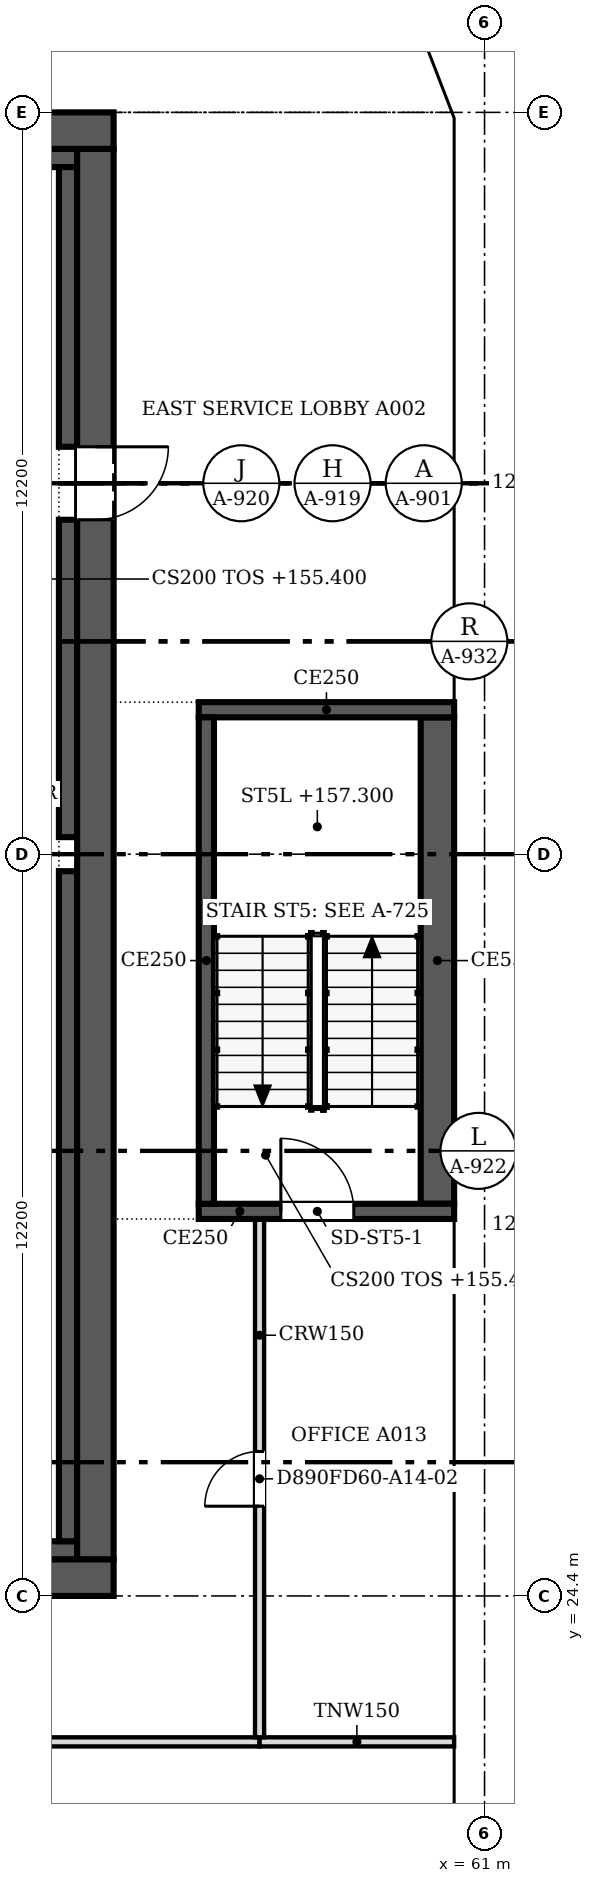
"""IFC4 building model, lengths in metres.
Left out: names, types, materials, properties, quantities, classifications, styles, units other than length and angle.
Written with IfcOpenShell. Run it as: python <this file> out.ifc"""

import sys

from ifc_helpers import new_model, si_unit, direction, frame, frame_2d, origin, place, context, subcontext, project, spatial, polyline, rectangle, outline, extrude, faceted_brep, source, transform, mapped, element, fill, save


model = new_model("IFC4")
c1 = context("Model", 3, precision=1e-05, world=origin(), true_north=direction((0.0, 1.0)))
c2 = subcontext(c1, "Body", "Model", "MODEL_VIEW")
j1 = project(units=[si_unit("LENGTHUNIT", "METRE"), si_unit("PLANEANGLEUNIT", "RADIAN")], contexts=[c1])
p1 = place(None, origin())
s1 = spatial("IfcSite", under=j1, at=p1, CompositionType="ELEMENT")
p2 = place(p1, origin())
s2 = spatial("IfcBuilding", under=s1, at=p2, CompositionType="ELEMENT")
p3 = place(p2, frame((0.0, 0.0, 155.4)))
s3 = spatial("IfcBuildingStorey", under=s2, at=p3, CompositionType="ELEMENT", Elevation=155.4)
m1 = source(origin(), c2, "Body", "Brep", [
    faceted_brep([(6.1, -0.25, 0.0), (3.05, -0.25, 3.8), (0.0, -0.25, 0.0), (6.1, -0.25, 0.0), (0.0, 0.25, 0.0), (3.05, 0.25, 3.8), (6.1, 0.25, 0.0), (6.1, 0.25, 0.0)], [[[0, 1, 2, 3]], [[4, 5, 6, 7]], [[6, 5, 1, 0]], [[5, 4, 2, 1]], [[4, 7, 3, 2]], [[3, 7, 6, 0]]]),
])
p4 = place(p3, frame((60.75, 18.3, 0.0), z_axis=(0.0, 0.0, 1.0), x_axis=(0.0, 1.0, 0.0)))
e1 = element("IfcWall", 1, at=p4, inside=s3, PredefinedType="SOLIDWALL", context=c2, shape_type="MappedRepresentation", body=[
    mapped(m1, transform((0.0, 0.0, 0.0), scale=1.0)),
])
m2 = source(origin(), c2, "Body", "SweptSolid", [
    extrude(outline(polyline([(5.579, 0.25), (3.05, 3.401), (0.521, 0.25), (5.579, 0.25)])), frame((0.0, 0.26, 0.0), z_axis=(0.0, -1.0, 0.0), x_axis=(1.0, 0.0, 0.0)), (0.0, 0.0, 1.0), 0.52),
])
p5 = place(p4, origin())
e2 = element("IfcOpeningElement", 2, at=p5, cuts=e1, PredefinedType="OPENING", context=c2, shape_type="MappedRepresentation", body=[
    mapped(m2, transform((0.0, 0.0, 0.0), scale=1.0)),
])
m3 = source(origin(), c2, "Body", "SweptSolid", [
    extrude(outline(polyline([(6.1, 0.0), (3.05, 3.8), (0.0, 0.0), (6.1, 0.0)])), frame((0.0, 0.25, 0.0), z_axis=(0.0, -1.0, 0.0), x_axis=(1.0, 0.0, 0.0)), (0.0, 0.0, 1.0), 0.5),
])
p6 = place(p3, frame((60.75, 24.4, 0.0), z_axis=(0.0, 0.0, 1.0), x_axis=(0.0, 1.0, 0.0)))
e3 = element("IfcWall", 3, at=p6, inside=s3, PredefinedType="SOLIDWALL", context=c2, shape_type="MappedRepresentation", body=[
    mapped(m3, transform((0.0, 0.0, 0.0), scale=1.0)),
])
p7 = place(p6, origin())
e4 = element("IfcOpeningElement", 4, at=p7, cuts=e3, PredefinedType="OPENING", context=c2, shape_type="MappedRepresentation", body=[
    mapped(m2, transform((0.0, 0.0, 0.0), scale=1.0)),
])
p8 = place(p3, frame((60.75, 30.5, 0.0), z_axis=(0.0, 0.0, 1.0), x_axis=(0.0, 1.0, 0.0)))
e5 = element("IfcWall", 5, at=p8, inside=s3, PredefinedType="SOLIDWALL", context=c2, shape_type="MappedRepresentation", body=[
    mapped(m3, transform((0.0, 0.0, 0.0), scale=1.0)),
])
p9 = place(p8, origin())
e6 = element("IfcOpeningElement", 6, at=p9, cuts=e5, PredefinedType="OPENING", context=c2, shape_type="MappedRepresentation", body=[
    mapped(m2, transform((0.0, 0.0, 0.0), scale=1.0)),
])
p10 = place(p3, frame((60.75, 36.6, 0.0), z_axis=(0.0, 0.0, 1.0), x_axis=(0.0, 1.0, 0.0)))
e7 = element("IfcWall", 7, at=p10, inside=s3, PredefinedType="SOLIDWALL", context=c2, shape_type="MappedRepresentation", body=[
    mapped(m1, transform((0.0, 0.0, 0.0), scale=1.0)),
])
p11 = place(p10, origin())
e8 = element("IfcOpeningElement", 8, at=p11, cuts=e7, PredefinedType="OPENING", context=c2, shape_type="MappedRepresentation", body=[
    mapped(m2, transform((0.0, 0.0, 0.0), scale=1.0)),
])
m4 = source(origin(), c2, "Body", "Brep", [
    faceted_brep([(6.053, -0.25, 0.0), (3.05, -0.25, 3.8), (0.0, -0.25, 0.0), (0.0, 0.25, 0.0), (3.05, 0.25, 3.8), (6.007, 0.25, 0.059), (6.007, 0.25, 0.0), (6.053, 0.0, 0.0)], [[[0, 1, 2]], [[3, 4, 5, 6]], [[5, 4, 1, 0, 7]], [[4, 3, 2, 1]], [[3, 6, 7, 0, 2]], [[7, 6, 5]]]),
])
p12 = place(p3, frame((60.75, 42.7, 0.0), z_axis=(0.0, 0.0, 1.0), x_axis=(0.0, 1.0, 0.0)))
e9 = element("IfcWall", 9, at=p12, inside=s3, PredefinedType="SOLIDWALL", context=c2, shape_type="MappedRepresentation", body=[
    mapped(m4, transform((0.0, 0.0, 0.0), scale=1.0)),
])
m5 = source(origin(), c2, "Body", "SweptSolid", [
    extrude(outline(polyline([(5.537, 0.25), (3.049, 3.399), (0.521, 0.25), (5.537, 0.25)])), frame((0.0, 0.26, 0.0), z_axis=(0.0, -1.0, 0.0), x_axis=(1.0, 0.0, 0.0)), (0.0, 0.0, 1.0), 0.52),
])
p13 = place(p12, origin())
e10 = element("IfcOpeningElement", 10, at=p13, cuts=e9, PredefinedType="OPENING", context=c2, shape_type="MappedRepresentation", body=[
    mapped(m5, transform((0.0, 0.0, 0.0), scale=1.0)),
])
m6 = source(origin(), c2, "Body", "Brep", [
    faceted_brep([(3.003, -0.25, 3.732), (2.95, -0.25, 3.8), (0.0, -0.25, 0.0), (3.003, -0.25, 0.0), (0.047, 0.25, 0.06), (2.898, 0.25, 3.732), (2.898, 0.25, 0.0), (0.047, 0.25, 0.0), (2.95, 0.0, 3.8), (0.0, 0.0, 0.0)], [[[0, 1, 2, 3]], [[4, 5, 6, 7]], [[8, 1, 0]], [[5, 4, 9, 2, 1, 8]], [[7, 6, 3, 2, 9]], [[7, 9, 4]], [[3, 6, 5, 8, 0]]]),
])
p14 = place(p3, frame((60.75, 48.753, 0.0), z_axis=(0.0, 0.0, 1.0), x_axis=(-0.35992665181, 0.932980602862, 0.0)))
e11 = element("IfcWall", 11, at=p14, inside=s3, PredefinedType="SOLIDWALL", context=c2, shape_type="MappedRepresentation", body=[
    mapped(m6, transform((0.0, 0.0, 0.0), scale=1.0)),
])
m7 = source(origin(), c2, "Body", "SweptSolid", [
    extrude(outline(polyline([(2.75, 3.135), (0.511, 0.25), (2.75, 0.25), (2.75, 3.135)])), frame((0.0, 0.26, 0.0), z_axis=(0.0, -1.0, 0.0), x_axis=(1.0, 0.0, 0.0)), (0.0, 0.0, 1.0), 0.52),
])
p15 = place(p14, origin())
e12 = element("IfcOpeningElement", 12, at=p15, cuts=e11, PredefinedType="OPENING", context=c2, shape_type="MappedRepresentation", body=[
    mapped(m7, transform((0.0, 0.0, 0.0), scale=1.0)),
])
p16 = place(p2, frame((0.0, 0.0, 159.2)))
s4 = spatial("IfcBuildingStorey", under=s2, at=p16, CompositionType="ELEMENT", Elevation=159.2)
m8 = source(origin(), c2, "Body", "SweptSolid", [
    extrude(outline(polyline([(3.05, 0.0), (6.1, 3.8), (3.05, 7.6), (0.0, 3.8), (3.05, 0.0)])), frame((0.0, 0.25, 0.0), z_axis=(0.0, -1.0, 0.0), x_axis=(1.0, 0.0, 0.0)), (0.0, 0.0, 1.0), 0.5),
])
p17 = place(p16, frame((60.75, 15.25, -3.8), z_axis=(0.0, 0.0, 1.0), x_axis=(0.0, 1.0, 0.0)))
e13 = element("IfcWall", 13, at=p17, inside=s4, PredefinedType="SOLIDWALL", context=c2, shape_type="MappedRepresentation", body=[
    mapped(m8, transform((0.0, 0.0, 0.0), scale=1.0)),
])
m9 = source(origin(), c2, "Body", "SweptSolid", [
    extrude(outline(polyline([(3.05, 0.399), (5.78, 3.8), (3.05, 7.201), (0.321, 3.8), (3.05, 0.399)])), frame((0.0, 0.26, 0.0), z_axis=(0.0, -1.0, 0.0), x_axis=(1.0, 0.0, 0.0)), (0.0, 0.0, 1.0), 0.52),
])
p18 = place(p17, origin())
e14 = element("IfcOpeningElement", 14, at=p18, cuts=e13, PredefinedType="OPENING", context=c2, shape_type="MappedRepresentation", body=[
    mapped(m9, transform((0.0, 0.0, 0.0), scale=1.0)),
])
m10 = source(origin(), c2, "Body", "Brep", [
    faceted_brep([(3.05, -0.25, 0.0), (6.1, -0.25, 3.8), (6.1, -0.25, 3.8), (3.05, -0.25, 7.6), (0.0, -0.25, 3.8), (0.0, 0.25, 3.8), (3.05, 0.25, 7.6), (6.1, 0.25, 3.8), (6.1, 0.25, 3.8), (3.05, 0.25, 0.0)], [[[0, 1, 2, 3, 4]], [[5, 6, 7, 8, 9]], [[9, 8, 1, 0]], [[7, 6, 3, 2]], [[6, 5, 4, 3]], [[5, 9, 0, 4]], [[1, 8, 7, 2]]]),
])
p19 = place(p16, frame((60.75, 21.35, -3.8), z_axis=(0.0, 0.0, 1.0), x_axis=(0.0, 1.0, 0.0)))
e15 = element("IfcWall", 15, at=p19, inside=s4, PredefinedType="SOLIDWALL", context=c2, shape_type="MappedRepresentation", body=[
    mapped(m10, transform((0.0, 0.0, 0.0), scale=1.0)),
])
p20 = place(p19, origin())
e16 = element("IfcOpeningElement", 16, at=p20, cuts=e15, PredefinedType="OPENING", context=c2, shape_type="MappedRepresentation", body=[
    mapped(m9, transform((0.0, 0.0, 0.0), scale=1.0)),
])
p21 = place(p16, frame((60.75, 27.45, -3.8), z_axis=(0.0, 0.0, 1.0), x_axis=(0.0, 1.0, 0.0)))
e17 = element("IfcWall", 17, at=p21, inside=s4, PredefinedType="SOLIDWALL", context=c2, shape_type="MappedRepresentation", body=[
    mapped(m8, transform((0.0, 0.0, 0.0), scale=1.0)),
])
p22 = place(p21, origin())
e18 = element("IfcOpeningElement", 18, at=p22, cuts=e17, PredefinedType="OPENING", context=c2, shape_type="MappedRepresentation", body=[
    mapped(m9, transform((0.0, 0.0, 0.0), scale=1.0)),
])
p23 = place(p16, frame((60.75, 33.55, -3.8), z_axis=(0.0, 0.0, 1.0), x_axis=(0.0, 1.0, 0.0)))
e19 = element("IfcWall", 19, at=p23, inside=s4, PredefinedType="SOLIDWALL", context=c2, shape_type="MappedRepresentation", body=[
    mapped(m10, transform((0.0, 0.0, 0.0), scale=1.0)),
])
p24 = place(p23, origin())
e20 = element("IfcOpeningElement", 20, at=p24, cuts=e19, PredefinedType="OPENING", context=c2, shape_type="MappedRepresentation", body=[
    mapped(m9, transform((0.0, 0.0, 0.0), scale=1.0)),
])
p25 = place(p16, frame((60.75, 39.65, -3.8), z_axis=(0.0, 0.0, 1.0), x_axis=(0.0, 1.0, 0.0)))
e21 = element("IfcWall", 21, at=p25, inside=s4, PredefinedType="SOLIDWALL", context=c2, shape_type="MappedRepresentation", body=[
    mapped(m8, transform((0.0, 0.0, 0.0), scale=1.0)),
])
p26 = place(p25, origin())
e22 = element("IfcOpeningElement", 22, at=p26, cuts=e21, PredefinedType="OPENING", context=c2, shape_type="MappedRepresentation", body=[
    mapped(m9, transform((0.0, 0.0, 0.0), scale=1.0)),
])
m11 = source(origin(), c2, "Body", "Brep", [
    faceted_brep([(3.003, -0.25, 0.0), (3.05, -0.25, 0.06), (3.05, -0.25, 7.54), (3.003, -0.25, 7.6), (0.0, -0.25, 3.8), (0.0, 0.25, 3.8), (2.957, 0.25, 7.541), (2.957, 0.25, 0.059), (3.003, 0.0, 0.0), (3.003, 0.0, 7.6)], [[[0, 1, 2, 3, 4]], [[5, 6, 7]], [[1, 0, 8]], [[9, 3, 2]], [[6, 5, 4, 3, 9]], [[5, 7, 8, 0, 4]], [[1, 8, 7, 6, 9, 2]]]),
])
p27 = place(p16, frame((60.75, 45.75, -3.8), z_axis=(0.0, 0.0, 1.0), x_axis=(0.0, 1.0, 0.0)))
e23 = element("IfcWall", 23, at=p27, inside=s4, PredefinedType="SOLIDWALL", context=c2, shape_type="MappedRepresentation", body=[
    mapped(m11, transform((0.0, 0.0, 0.0), scale=1.0)),
])
m12 = source(origin(), c2, "Body", "SweptSolid", [
    extrude(outline(polyline([(2.803, 6.944), (0.319, 3.8), (2.803, 0.656), (2.803, 6.944)])), frame((0.0, 0.26, 0.0), z_axis=(0.0, -1.0, 0.0), x_axis=(1.0, 0.0, 0.0)), (0.0, 0.0, 1.0), 0.52),
])
p28 = place(p27, origin())
e24 = element("IfcOpeningElement", 24, at=p28, cuts=e23, PredefinedType="OPENING", context=c2, shape_type="MappedRepresentation", body=[
    mapped(m12, transform((0.0, 0.0, 0.0), scale=1.0)),
])
m13 = source(origin(), c2, "Body", "Brep", [
    faceted_brep([(0.047, -0.25, 0.0), (2.997, -0.25, 3.8), (0.047, -0.25, 7.6), (0.0, -0.25, 7.541), (0.0, -0.25, 0.059), (0.093, 0.25, 7.54), (2.944, 0.25, 3.868), (2.944, 0.25, 3.732), (0.093, 0.25, 0.06), (2.997, 0.0, 3.8), (0.047, 0.0, 0.0), (0.047, 0.0, 7.6)], [[[0, 1, 2, 3, 4]], [[5, 6, 7, 8]], [[8, 7, 9, 1, 0, 10]], [[6, 5, 11, 2, 1, 9]], [[3, 2, 11]], [[10, 0, 4]], [[8, 10, 4, 3, 11, 5]], [[9, 7, 6]]]),
])
p29 = place(p16, frame((60.767, 48.71, -3.8), z_axis=(0.0, 0.0, 1.0), x_axis=(-0.359901446078, 0.932990326376, 0.0)))
e25 = element("IfcWall", 25, at=p29, inside=s4, PredefinedType="SOLIDWALL", context=c2, shape_type="MappedRepresentation", body=[
    mapped(m13, transform((0.0, 0.0, 0.0), scale=1.0)),
])
m14 = source(origin(), c2, "Body", "SweptSolid", [
    extrude(outline(polyline([(0.247, 0.665), (2.681, 3.8), (0.247, 6.935), (0.247, 0.665)])), frame((0.0, 0.26, 0.0), z_axis=(0.0, -1.0, 0.0), x_axis=(1.0, 0.0, 0.0)), (0.0, 0.0, 1.0), 0.52),
])
p30 = place(p29, origin())
e26 = element("IfcOpeningElement", 26, at=p30, cuts=e25, PredefinedType="OPENING", context=c2, shape_type="MappedRepresentation", body=[
    mapped(m14, transform((0.0, 0.0, 0.0), scale=1.0)),
])
p31 = place(p3, frame((54.9, 24.7, 0.0), z_axis=(0.0, 0.0, 1.0), x_axis=(-1.0, 0.0, 0.0)))
e27 = element("IfcWall", 27, at=p31, inside=s3, PredefinedType="SHEAR", context=c2, shape_type="SweptSolid", body=[
    extrude(rectangle(XDim=24.4, YDim=0.6, at=frame_2d((12.2, 0.0))), origin(), (0.0, 0.0, 1.0), 3.8),
])
m15 = source(origin(), c2, "Body", "SweptSolid", [
    extrude(rectangle(XDim=1.2, YDim=2.1, at=frame_2d((0.6, 1.05))), frame((0.0, 0.31, 0.0), z_axis=(0.0, -1.0, 0.0), x_axis=(1.0, 0.0, 0.0)), (0.0, 0.0, 1.0), 0.62),
])
p32 = place(p31, frame((1.5, 0.0, 0.0)))
e28 = element("IfcOpeningElement", 28, at=p32, cuts=e27, PredefinedType="OPENING", context=c2, shape_type="MappedRepresentation", body=[
    mapped(m15, transform((0.0, 0.0, 0.0), scale=1.0)),
])
p33 = place(p3, frame((30.5, 48.5, 0.0), z_axis=(0.0, 0.0, 1.0), x_axis=(1.0, 0.0, 0.0)))
e29 = element("IfcWall", 29, at=p33, inside=s3, PredefinedType="SHEAR", context=c2, shape_type="SweptSolid", body=[
    extrude(rectangle(XDim=24.4, YDim=0.6, at=frame_2d((12.2, 0.0))), origin(), (0.0, 0.0, 1.0), 3.8),
])
p34 = place(p3, frame((54.6, 48.2, 0.0), z_axis=(0.0, 0.0, 1.0), x_axis=(0.0, -1.0, 0.0)))
e30 = element("IfcWall", 30, at=p34, inside=s3, PredefinedType="SHEAR", context=c2, shape_type="SweptSolid", body=[
    extrude(rectangle(XDim=23.2, YDim=0.6, at=frame_2d((11.6, 0.0))), origin(), (0.0, 0.0, 1.0), 3.8),
])
p35 = place(p34, frame((4.9, 0.0, 0.0)))
e31 = element("IfcOpeningElement", 31, at=p35, cuts=e30, PredefinedType="OPENING", context=c2, shape_type="MappedRepresentation", body=[
    mapped(m15, transform((0.0, 0.0, 0.0), scale=1.0)),
])
p36 = place(p3, frame((53.4, 25.15, 0.0), z_axis=(0.0, 0.0, 1.0), x_axis=(1.0, 0.0, 0.0)))
e32 = element("IfcWall", 32, at=p36, inside=s3, PredefinedType="SOLIDWALL", context=c2, shape_type="SweptSolid", body=[
    extrude(rectangle(XDim=0.9, YDim=0.3, at=frame_2d((0.45, 0.0))), origin(), (0.0, 0.0, 1.0), 3.8),
])
p37 = place(p3, frame((31.1, 48.05, 0.0), z_axis=(0.0, 0.0, 1.0), x_axis=(1.0, 0.0, 0.0)))
e33 = element("IfcWall", 33, at=p37, inside=s3, PredefinedType="SOLIDWALL", context=c2, shape_type="SweptSolid", body=[
    extrude(rectangle(XDim=23.2, YDim=0.3, at=frame_2d((11.6, 0.0))), origin(), (0.0, 0.0, 1.0), 3.8),
])
p38 = place(p3, frame((54.15, 25.3, 0.0), z_axis=(0.0, 0.0, 1.0), x_axis=(0.0, 1.0, 0.0)))
e34 = element("IfcWall", 34, at=p38, inside=s3, PredefinedType="SOLIDWALL", context=c2, shape_type="SweptSolid", body=[
    extrude(rectangle(XDim=11.02, YDim=0.3, at=frame_2d((5.51, 0.0))), origin(), (0.0, 0.0, 1.0), 3.8),
])
p39 = place(p3, frame((54.15, 36.88, 0.0), z_axis=(0.0, 0.0, 1.0), x_axis=(0.0, 1.0, 0.0)))
e35 = element("IfcWall", 35, at=p39, inside=s3, PredefinedType="SOLIDWALL", context=c2, shape_type="SweptSolid", body=[
    extrude(rectangle(XDim=5.22, YDim=0.3, at=frame_2d((2.61, 0.0))), origin(), (0.0, 0.0, 1.0), 3.8),
])
p40 = place(p3, frame((54.15, 43.3, 0.0), z_axis=(0.0, 0.0, 1.0), x_axis=(0.0, 1.0, 0.0)))
e36 = element("IfcWall", 36, at=p40, inside=s3, PredefinedType="SOLIDWALL", context=c2, shape_type="SweptSolid", body=[
    extrude(rectangle(XDim=4.6, YDim=0.3, at=frame_2d((2.3, 0.0))), origin(), (0.0, 0.0, 1.0), 3.8),
])
p41 = place(p3, frame((60.5, 30.725, 0.0), z_axis=(0.0, 0.0, 1.0), x_axis=(-1.0, 0.0, 0.0)))
e37 = element("IfcWall", 37, at=p41, inside=s3, PredefinedType="SOLIDWALL", context=c2, shape_type="SweptSolid", body=[
    extrude(rectangle(XDim=4.2, YDim=0.25, at=frame_2d((2.1, 0.0))), origin(), (0.0, 0.0, 1.0), 3.8),
])
m16 = source(origin(), c2, "Body", "SweptSolid", [
    extrude(rectangle(XDim=1.2, YDim=2.1, at=frame_2d((0.6, 1.05))), frame((0.0, 0.135, 0.0), z_axis=(0.0, -1.0, 0.0), x_axis=(1.0, 0.0, 0.0)), (0.0, 0.0, 1.0), 0.27),
])
p42 = place(p41, frame((1.65, 0.0, 0.0)))
e38 = element("IfcOpeningElement", 38, at=p42, cuts=e37, PredefinedType="OPENING", context=c2, shape_type="MappedRepresentation", body=[
    mapped(m16, transform((0.0, 0.0, 0.0), scale=1.0)),
])
p43 = place(p3, frame((56.425, 30.85, 0.0), z_axis=(0.0, 0.0, 1.0), x_axis=(0.0, 1.0, 0.0)))
e39 = element("IfcWall", 39, at=p43, inside=s3, PredefinedType="SOLIDWALL", context=c2, shape_type="SweptSolid", body=[
    extrude(rectangle(XDim=8.0, YDim=0.25, at=frame_2d((4.0, 0.0))), origin(), (0.0, 0.0, 1.0), 3.8),
])
p44 = place(p3, frame((56.3, 38.975, 0.0), z_axis=(0.0, 0.0, 1.0), x_axis=(1.0, 0.0, 0.0)))
e40 = element("IfcWall", 40, at=p44, inside=s3, PredefinedType="SOLIDWALL", context=c2, shape_type="SweptSolid", body=[
    extrude(rectangle(XDim=4.2, YDim=0.25, at=frame_2d((2.1, 0.0))), origin(), (0.0, 0.0, 1.0), 3.8),
])
p45 = place(p3, frame((60.225, 38.85, 0.0), z_axis=(0.0, 0.0, 1.0), x_axis=(0.0, -1.0, 0.0)))
e41 = element("IfcWall", 41, at=p45, inside=s3, PredefinedType="SOLIDWALL", context=c2, shape_type="SweptSolid", body=[
    extrude(rectangle(XDim=8.0, YDim=0.55, at=frame_2d((4.0, 0.0))), origin(), (0.0, 0.0, 1.0), 3.8),
])
p46 = place(p3, frame((45.4, 22.0, 0.0), z_axis=(0.0, 0.0, 1.0), x_axis=(1.0, 0.0, 0.0)))
e42 = element("IfcWall", 42, at=p46, inside=s3, PredefinedType="PARTITIONING", context=c2, shape_type="SweptSolid", body=[
    extrude(rectangle(XDim=11.9, YDim=0.15, at=frame_2d((5.95, 0.0))), origin(), (0.0, 0.0, 1.0), 3.067),
])
p47 = place(p3, frame((57.301, 22.0, 0.0), z_axis=(0.0, 0.0, 1.0), x_axis=(1.0, 0.0, 0.0)))
e43 = element("IfcWall", 43, at=p47, inside=s3, PredefinedType="PARTITIONING", context=c2, shape_type="SweptSolid", body=[
    extrude(rectangle(XDim=3.199, YDim=0.15, at=frame_2d((1.6, 0.0))), origin(), (0.0, 0.0, 1.0), 3.067),
])
p48 = place(p3, frame((57.3, 30.6, 0.0), z_axis=(0.0, 0.0, 1.0), x_axis=(0.0, -1.0, 0.0)))
e44 = element("IfcWall", 44, at=p48, inside=s3, PredefinedType="PARTITIONING", context=c2, shape_type="SweptSolid", body=[
    extrude(rectangle(XDim=8.524, YDim=0.15, at=frame_2d((4.262, 0.0))), origin(), (0.0, 0.0, 1.0), 3.067),
])
m17 = source(origin(), c2, "Body", "SweptSolid", [
    extrude(rectangle(XDim=0.9, YDim=2.1, at=frame_2d((0.45, 1.05))), frame((0.0, 0.085, 0.0), z_axis=(0.0, -1.0, 0.0), x_axis=(1.0, 0.0, 0.0)), (0.0, 0.0, 1.0), 0.17),
])
p49 = place(p48, frame((3.824, 0.0, 0.0)))
e45 = element("IfcOpeningElement", 45, at=p49, cuts=e44, PredefinedType="OPENING", context=c2, shape_type="MappedRepresentation", body=[
    mapped(m17, transform((0.0, 0.0, 0.0), scale=1.0)),
])
m18 = source(origin(), c2, "Body", "SweptSolid", [
    extrude(rectangle(XDim=1.2, YDim=2.1, at=frame_2d((0.6, 1.05))), frame((0.0, 0.025, 0.0), z_axis=(0.0, -1.0, 0.0), x_axis=(1.0, 0.0, 0.0)), (0.0, 0.0, 1.0), 0.05),
])
p50 = place(p35, origin())
e46 = element("IfcDoor", 46, at=p50, inside=s3, OperationType="SINGLE_SWING_LEFT", PredefinedType="DOOR", context=c2, shape_type="MappedRepresentation", body=[
    mapped(m18, transform((0.0, 0.0, 0.0), scale=1.0)),
])
fill(e31, e46)
p51 = place(p42, origin())
e47 = element("IfcDoor", 47, at=p51, inside=s3, OperationType="SINGLE_SWING_RIGHT", PredefinedType="DOOR", context=c2, shape_type="MappedRepresentation", body=[
    mapped(m18, transform((0.0, 0.0, 0.0), scale=1.0)),
])
fill(e38, e47)
m19 = source(origin(), c2, "Body", "SweptSolid", [
    extrude(rectangle(XDim=0.9, YDim=2.1, at=frame_2d((0.45, 1.05))), frame((0.0, 0.025, 0.0), z_axis=(0.0, -1.0, 0.0), x_axis=(1.0, 0.0, 0.0)), (0.0, 0.0, 1.0), 0.05),
])
p52 = place(p49, origin())
e48 = element("IfcDoor", 48, at=p52, inside=s3, OperationType="SINGLE_SWING_RIGHT", PredefinedType="DOOR", context=c2, shape_type="MappedRepresentation", body=[
    mapped(m19, transform((0.0, 0.0, 0.0), scale=1.0)),
])
fill(e45, e48)
save(model, sys.argv[1])
